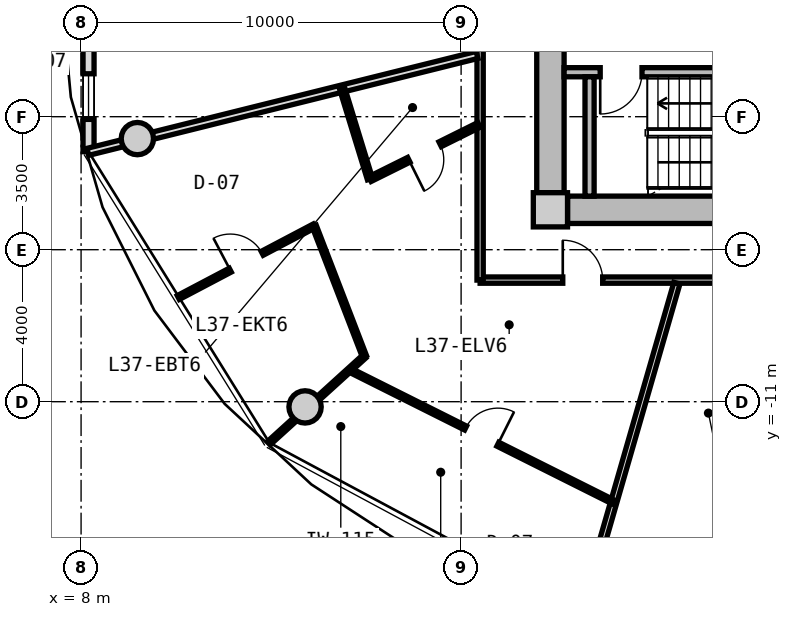
"""IFC4 building model, lengths in metres.
Left out: names, types, materials, properties, quantities, classifications, styles, units other than length and angle.
Written with IfcOpenShell. Run it as: python <this file> out.ifc"""

import sys

from ifc_helpers import new_model, si_unit, direction, frame, frame_2d, origin, origin_2d, place, context, subcontext, project, spatial, rectangle, circle, extrude, source, transform, mapped, element, fill, save


model = new_model("IFC4")
c1 = context("Model", 3, precision=1e-05, world=origin(), true_north=direction((0.0, 1.0)))
c2 = subcontext(c1, "Body", "Model", "MODEL_VIEW")
j1 = project(units=[si_unit("LENGTHUNIT", "METRE"), si_unit("PLANEANGLEUNIT", "RADIAN")], contexts=[c1])
p1 = place(None, origin())
s1 = spatial("IfcSite", under=j1, at=p1, CompositionType="ELEMENT")
p2 = place(p1, origin())
s2 = spatial("IfcBuilding", under=s1, at=p2, CompositionType="ELEMENT")
p3 = place(p2, frame((0.0, 0.0, 120.65)))
s3 = spatial("IfcBuildingStorey", under=s2, at=p3, CompositionType="ELEMENT", Elevation=120.65)
m1 = source(origin(), c2, "Body", "SweptSolid", [
    extrude(rectangle(XDim=0.9, YDim=0.9, at=origin_2d()), origin(), (0.0, 0.0, 1.0), 3.05),
])
p4 = place(p3, frame((20.35, -5.95, 0.0), z_axis=(0.0, 0.0, 1.0), x_axis=(1.0, 0.0, 0.0)))
e1 = element("IfcColumn", 1, at=p4, inside=s3, PredefinedType="COLUMN", context=c2, shape_type="MappedRepresentation", body=[
    mapped(m1, transform((0.0, 0.0, 0.0), x_axis=(1.0, 0.0, 0.0), y_axis=(0.0, 1.0, 0.0), z_axis=(0.0, 0.0, 1.0), scale=1.0)),
])
m2 = source(origin(), c2, "Body", "SweptSolid", [
    extrude(rectangle(XDim=14.4, YDim=0.72, at=frame_2d((7.2, 0.0))), origin(), (0.0, 0.0, 1.0), 2.79),
])
p5 = place(p3, frame((35.2, -5.95, 0.0), z_axis=(0.0, 0.0, 1.0), x_axis=(-1.0, 0.0, 0.0)))
e2 = element("IfcWall", 2, at=p5, inside=s3, PredefinedType="SHEAR", context=c2, shape_type="MappedRepresentation", body=[
    mapped(m2, transform((0.0, 0.0, 0.0), x_axis=(1.0, 0.0, 0.0), y_axis=(0.0, 1.0, 0.0), z_axis=(0.0, 0.0, 1.0), scale=1.0)),
])
m3 = source(origin(), c2, "Body", "SweptSolid", [
    extrude(rectangle(XDim=11.0, YDim=0.72, at=frame_2d((5.5, 0.0))), origin(), (0.0, 0.0, 1.0), 2.79),
])
p6 = place(p3, frame((20.35, -5.5, 0.0), z_axis=(0.0, 0.0, 1.0), x_axis=(0.0, 1.0, 0.0)))
e3 = element("IfcWall", 3, at=p6, inside=s3, PredefinedType="SHEAR", context=c2, shape_type="MappedRepresentation", body=[
    mapped(m3, transform((0.0, 0.0, 0.0), x_axis=(1.0, 0.0, 0.0), y_axis=(0.0, 1.0, 0.0), z_axis=(0.0, 0.0, 1.0), scale=1.0)),
])
p7 = place(p6, frame((3.8, 0.0, 0.0)))
e4 = element("IfcOpeningElement", 4, at=p7, cuts=e3, PredefinedType="OPENING", context=c2, shape_type="SweptSolid", body=[
    extrude(rectangle(XDim=1.2, YDim=2.15, at=frame_2d((0.6, 1.075))), frame((0.0, 0.37, 0.0), z_axis=(0.0, -1.0, 0.0), x_axis=(1.0, 0.0, 0.0)), (0.0, 0.0, 1.0), 0.74),
])
m4 = source(origin(), c2, "Body", "SweptSolid", [
    extrude(circle(Radius=0.425, at=origin_2d()), origin(), (0.0, 0.0, 1.0), 3.05),
])
for number, where, z_axis, x_axis in (
    (5, (9.481, -4.076, 0.0), (0.0, 0.0, 1.0), (1.0, 0.0, 0.0)),
    (6, (13.894, -11.137, 0.0), (0.0, 0.0, 1.0), (1.0, 0.0, 0.0)),
):
    element("IfcColumn", number, at=place(p3, frame(where, z_axis=z_axis, x_axis=x_axis)), inside=s3, PredefinedType="COLUMN", context=c2, shape_type="MappedRepresentation", body=[
        mapped(m4, transform((0.0, 0.0, 0.0), x_axis=(1.0, 0.0, 0.0), y_axis=(0.0, 1.0, 0.0), z_axis=(0.0, 0.0, 1.0), scale=1.0)),
    ])
m5 = source(origin(), c2, "Body", "SweptSolid", [
    extrude(rectangle(XDim=8.841, YDim=0.29, at=frame_2d((4.421, 0.0))), origin(), (0.0, 0.0, 1.0), 2.79),
])
p8 = place(p3, frame((8.196, -4.421, 0.0), z_axis=(0.0, 0.0, 1.0), x_axis=(0.0, 1.0, 0.0)))
e7 = element("IfcWall", 7, at=p8, inside=s3, PredefinedType="SOLIDWALL", context=c2, shape_type="MappedRepresentation", body=[
    mapped(m5, transform((0.0, 0.0, 0.0), x_axis=(1.0, 0.0, 0.0), y_axis=(0.0, 1.0, 0.0), z_axis=(0.0, 0.0, 1.0), scale=1.0)),
])
p9 = place(p8, frame((6.74, 0.0, 0.0)))
e8 = element("IfcOpeningElement", 8, at=p9, cuts=e7, PredefinedType="OPENING", context=c2, shape_type="SweptSolid", body=[
    extrude(rectangle(XDim=1.15, YDim=2.25, at=frame_2d((0.575, 1.125))), frame((0.0, 0.155, 0.0), z_axis=(0.0, -1.0, 0.0), x_axis=(1.0, 0.0, 0.0)), (0.0, 0.0, 1.0), 0.31),
])
p10 = place(p8, frame((0.85, 0.0, 0.85)))
e9 = element("IfcOpeningElement", 9, at=p10, cuts=e7, PredefinedType="OPENING", context=c2, shape_type="SweptSolid", body=[
    extrude(rectangle(XDim=1.2, YDim=1.5, at=frame_2d((0.6, 0.75))), frame((0.0, 0.155, 0.0), z_axis=(0.0, -1.0, 0.0), x_axis=(1.0, 0.0, 0.0)), (0.0, 0.0, 1.0), 0.31),
])
m6 = source(origin(), c2, "Body", "SweptSolid", [
    extrude(rectangle(XDim=7.83, YDim=0.24, at=frame_2d((3.915, 0.0))), origin(), (0.0, 0.0, 1.0), 2.79),
])
p11 = place(p3, frame((20.71, -2.33, 0.0), z_axis=(0.0, 0.0, 1.0), x_axis=(1.0, 0.0, 0.0)))
e10 = element("IfcWall", 10, at=p11, inside=s3, PredefinedType="PARTITIONING", context=c2, shape_type="MappedRepresentation", body=[
    mapped(m6, transform((0.0, 0.0, 0.0), x_axis=(1.0, 0.0, 0.0), y_axis=(0.0, 1.0, 0.0), z_axis=(0.0, 0.0, 1.0), scale=1.0)),
])
p12 = place(p11, frame((0.95, 0.0, 0.0)))
e11 = element("IfcOpeningElement", 11, at=p12, cuts=e10, PredefinedType="OPENING", context=c2, shape_type="SweptSolid", body=[
    extrude(rectangle(XDim=1.1, YDim=2.15, at=frame_2d((0.55, 1.075))), frame((0.0, 0.13, 0.0), z_axis=(0.0, -1.0, 0.0), x_axis=(1.0, 0.0, 0.0)), (0.0, 0.0, 1.0), 0.26),
])
m7 = source(origin(), c2, "Body", "SweptSolid", [
    extrude(rectangle(XDim=3.14, YDim=0.24, at=frame_2d((1.57, 0.0))), origin(), (0.0, 0.0, 1.0), 2.79),
])
p13 = place(p3, frame((21.38, -5.59, 0.0), z_axis=(0.0, 0.0, 1.0), x_axis=(0.0, 1.0, 0.0)))
e12 = element("IfcWall", 12, at=p13, inside=s3, PredefinedType="PARTITIONING", context=c2, shape_type="MappedRepresentation", body=[
    mapped(m7, transform((0.0, 0.0, 0.0), x_axis=(1.0, 0.0, 0.0), y_axis=(0.0, 1.0, 0.0), z_axis=(0.0, 0.0, 1.0), scale=1.0)),
])
m8 = source(origin(), c2, "Body", "SweptSolid", [
    extrude(rectangle(XDim=8.6, YDim=0.165, at=frame_2d((4.3, 0.0))), origin(), (0.0, 0.0, 1.0), 2.775),
])
p14 = place(p3, frame((27.1, -7.8, 0.0), z_axis=(0.0, 0.0, 1.0), x_axis=(-1.0, 0.0, 0.0)))
e13 = element("IfcWall", 13, at=p14, inside=s3, PredefinedType="PARTITIONING", context=c2, shape_type="MappedRepresentation", body=[
    mapped(m8, transform((0.0, 0.0, 0.0), x_axis=(1.0, 0.0, 0.0), y_axis=(0.0, 1.0, 0.0), z_axis=(0.0, 0.0, 1.0), scale=1.0)),
])
p15 = place(p14, frame((5.375, 0.0, 0.0)))
e14 = element("IfcOpeningElement", 14, at=p15, cuts=e13, PredefinedType="OPENING", context=c2, shape_type="SweptSolid", body=[
    extrude(rectangle(XDim=1.05, YDim=2.15, at=frame_2d((0.525, 1.075))), frame((0.0, 0.093, 0.0), z_axis=(0.0, -1.0, 0.0), x_axis=(1.0, 0.0, 0.0)), (0.0, 0.0, 1.0), 0.185),
])
m9 = source(origin(), c2, "Body", "SweptSolid", [
    extrude(rectangle(XDim=15.6, YDim=0.165, at=frame_2d((7.8, 0.0))), origin(), (0.0, 0.0, 1.0), 2.775),
])
p16 = place(p3, frame((18.5, -7.8, 0.0), z_axis=(0.0, 0.0, 1.0), x_axis=(0.0, 1.0, 0.0)))
e15 = element("IfcWall", 15, at=p16, inside=s3, PredefinedType="PARTITIONING", context=c2, shape_type="MappedRepresentation", body=[
    mapped(m9, transform((0.0, 0.0, 0.0), x_axis=(1.0, 0.0, 0.0), y_axis=(0.0, 1.0, 0.0), z_axis=(0.0, 0.0, 1.0), scale=1.0)),
])
p17 = place(p16, frame((10.383, 0.0, 0.0)))
e16 = element("IfcOpeningElement", 16, at=p17, cuts=e15, PredefinedType="OPENING", context=c2, shape_type="SweptSolid", body=[
    extrude(rectangle(XDim=1.05, YDim=2.15, at=frame_2d((0.525, 1.075))), frame((0.0, 0.093, 0.0), z_axis=(0.0, -1.0, 0.0), x_axis=(1.0, 0.0, 0.0)), (0.0, 0.0, 1.0), 0.185),
])
p18 = place(p16, frame((6.419, 0.0, 0.0)))
e17 = element("IfcOpeningElement", 17, at=p18, cuts=e15, PredefinedType="OPENING", context=c2, shape_type="SweptSolid", body=[
    extrude(rectangle(XDim=1.05, YDim=2.15, at=frame_2d((0.525, 1.075))), frame((0.0, 0.093, 0.0), z_axis=(0.0, -1.0, 0.0), x_axis=(1.0, 0.0, 0.0)), (0.0, 0.0, 1.0), 0.185),
])
m10 = source(origin(), c2, "Body", "SweptSolid", [
    extrude(rectangle(XDim=8.989, YDim=0.165, at=frame_2d((4.495, 0.0))), origin(), (0.0, 0.0, 1.0), 2.275),
])
p19 = place(p3, frame((23.678, -7.88, 0.0), z_axis=(0.0, 0.0, 1.0), x_axis=(-0.27702323008, -0.960863221274, 0.0)))
e18 = element("IfcWall", 18, at=p19, inside=s3, PredefinedType="PARTITIONING", context=c2, shape_type="MappedRepresentation", body=[
    mapped(m10, transform((0.0, 0.0, 0.0), x_axis=(1.0, 0.0, 0.0), y_axis=(0.0, 1.0, 0.0), z_axis=(0.0, 0.0, 1.0), scale=1.0)),
])
m11 = source(origin(), c2, "Body", "SweptSolid", [
    extrude(rectangle(XDim=10.556, YDim=0.19, at=frame_2d((5.278, 0.0))), origin(), (0.0, 0.0, 1.0), 2.275),
])
p20 = place(p3, frame((18.42, -1.875, 0.0), z_axis=(0.0, 0.0, 1.0), x_axis=(-0.970363857851, -0.241648470667, 0.0)))
e19 = element("IfcWall", 19, at=p20, inside=s3, PredefinedType="PARTITIONING", context=c2, shape_type="MappedRepresentation", body=[
    mapped(m11, transform((0.0, 0.0, 0.0), x_axis=(1.0, 0.0, 0.0), y_axis=(0.0, 1.0, 0.0), z_axis=(0.0, 0.0, 1.0), scale=1.0)),
])
m12 = source(origin(), c2, "Body", "SweptSolid", [
    extrude(rectangle(XDim=7.767, YDim=0.115, at=frame_2d((3.884, 0.0))), origin(), (0.0, 0.0, 1.0), 2.775),
])
p21 = place(p3, frame((15.07, -10.167, 0.0), z_axis=(0.0, 0.0, 1.0), x_axis=(0.894188177352, -0.447691303783, 0.0)))
e20 = element("IfcWall", 20, at=p21, inside=s3, PredefinedType="PARTITIONING", context=c2, shape_type="MappedRepresentation", body=[
    mapped(m12, transform((0.0, 0.0, 0.0), x_axis=(1.0, 0.0, 0.0), y_axis=(0.0, 1.0, 0.0), z_axis=(0.0, 0.0, 1.0), scale=1.0)),
])
p22 = place(p21, frame((3.409, 0.0, 0.0)))
e21 = element("IfcOpeningElement", 21, at=p22, cuts=e20, PredefinedType="OPENING", context=c2, shape_type="SweptSolid", body=[
    extrude(rectangle(XDim=0.95, YDim=2.1, at=frame_2d((0.475, 1.05))), frame((0.0, 0.067, 0.0), z_axis=(0.0, -1.0, 0.0), x_axis=(1.0, 0.0, 0.0)), (0.0, 0.0, 1.0), 0.135),
])
m13 = source(origin(), c2, "Body", "SweptSolid", [
    extrude(rectangle(XDim=3.393, YDim=0.115, at=frame_2d((1.696, 0.0))), origin(), (0.0, 0.0, 1.0), 2.275),
])
p23 = place(p3, frame((15.451, -9.811, 0.0), z_axis=(0.0, 0.0, 1.0), x_axis=(-0.740356690907, -0.672214229416, 0.0)))
e22 = element("IfcWall", 22, at=p23, inside=s3, PredefinedType="PARTITIONING", context=c2, shape_type="MappedRepresentation", body=[
    mapped(m13, transform((0.0, 0.0, 0.0), x_axis=(1.0, 0.0, 0.0), y_axis=(0.0, 1.0, 0.0), z_axis=(0.0, 0.0, 1.0), scale=1.0)),
])
m14 = source(origin(), c2, "Body", "SweptSolid", [
    extrude(rectangle(XDim=3.203, YDim=0.14, at=frame_2d((1.601, 0.0))), origin(), (0.0, 0.0, 1.0), 2.775),
])
p24 = place(p3, frame((18.47, -3.717, 0.0), z_axis=(0.0, 0.0, 1.0), x_axis=(-0.895552551978, -0.444955758077, 0.0)))
e23 = element("IfcWall", 23, at=p24, inside=s3, PredefinedType="PARTITIONING", context=c2, shape_type="MappedRepresentation", body=[
    mapped(m14, transform((0.0, 0.0, 0.0), x_axis=(1.0, 0.0, 0.0), y_axis=(0.0, 1.0, 0.0), z_axis=(0.0, 0.0, 1.0), scale=1.0)),
])
p25 = place(p24, frame((1.141, 0.0, 0.0)))
e24 = element("IfcOpeningElement", 24, at=p25, cuts=e23, PredefinedType="OPENING", context=c2, shape_type="SweptSolid", body=[
    extrude(rectangle(XDim=0.92, YDim=2.1, at=frame_2d((0.46, 1.05))), frame((0.0, 0.08, 0.0), z_axis=(0.0, -1.0, 0.0), x_axis=(1.0, 0.0, 0.0)), (0.0, 0.0, 1.0), 0.16),
])
m15 = source(origin(), c2, "Body", "SweptSolid", [
    extrude(rectangle(XDim=2.478, YDim=0.14, at=frame_2d((1.239, 0.0))), origin(), (0.0, 0.0, 1.0), 2.775),
])
p26 = place(p3, frame((15.602, -5.142, 0.0), z_axis=(0.0, 0.0, 1.0), x_axis=(-0.293372504398, 0.955998207981, 0.0)))
e25 = element("IfcWall", 25, at=p26, inside=s3, PredefinedType="PARTITIONING", context=c2, shape_type="MappedRepresentation", body=[
    mapped(m15, transform((0.0, 0.0, 0.0), x_axis=(1.0, 0.0, 0.0), y_axis=(0.0, 1.0, 0.0), z_axis=(0.0, 0.0, 1.0), scale=1.0)),
])
m16 = source(origin(), c2, "Body", "SweptSolid", [
    extrude(rectangle(XDim=4.042, YDim=0.115, at=frame_2d((2.021, 0.0))), origin(), (0.0, 0.0, 1.0), 2.775),
])
p27 = place(p3, frame((14.134, -6.375, 0.0), z_axis=(0.0, 0.0, 1.0), x_axis=(-0.88476748851, -0.466032714812, 0.0)))
e26 = element("IfcWall", 26, at=p27, inside=s3, PredefinedType="PARTITIONING", context=c2, shape_type="MappedRepresentation", body=[
    mapped(m16, transform((0.0, 0.0, 0.0), x_axis=(1.0, 0.0, 0.0), y_axis=(0.0, 1.0, 0.0), z_axis=(0.0, 0.0, 1.0), scale=1.0)),
])
p28 = place(p27, frame((1.546, 0.0, 0.0)))
e27 = element("IfcOpeningElement", 27, at=p28, cuts=e26, PredefinedType="OPENING", context=c2, shape_type="SweptSolid", body=[
    extrude(rectangle(XDim=0.95, YDim=2.1, at=frame_2d((0.475, 1.05))), frame((0.0, 0.067, 0.0), z_axis=(0.0, -1.0, 0.0), x_axis=(1.0, 0.0, 0.0)), (0.0, 0.0, 1.0), 0.135),
])
m17 = source(origin(), c2, "Body", "SweptSolid", [
    extrude(rectangle(XDim=3.677, YDim=0.115, at=frame_2d((1.838, 0.0))), origin(), (0.0, 0.0, 1.0), 2.775),
])
p29 = place(p3, frame((14.134, -6.375, 0.0), z_axis=(0.0, 0.0, 1.0), x_axis=(0.359592980271, -0.933109258629, 0.0)))
e28 = element("IfcWall", 28, at=p29, inside=s3, PredefinedType="PARTITIONING", context=c2, shape_type="MappedRepresentation", body=[
    mapped(m17, transform((0.0, 0.0, 0.0), x_axis=(1.0, 0.0, 0.0), y_axis=(0.0, 1.0, 0.0), z_axis=(0.0, 0.0, 1.0), scale=1.0)),
])
m18 = source(origin(), c2, "Body", "SweptSolid", [
    extrude(rectangle(XDim=1.2, YDim=1.5, at=frame_2d((0.6, 0.75))), frame((0.0, 0.03, 0.0), z_axis=(0.0, -1.0, 0.0), x_axis=(1.0, 0.0, 0.0)), (0.0, 0.0, 1.0), 0.06),
])
p30 = place(p10, origin())
e29 = element("IfcWindow", 29, at=p30, inside=s3, PartitioningType="SINGLE_PANEL", PredefinedType="WINDOW", context=c2, shape_type="MappedRepresentation", body=[
    mapped(m18, transform((0.0, 0.0, 0.0), x_axis=(1.0, 0.0, 0.0), y_axis=(0.0, 1.0, 0.0), z_axis=(0.0, 0.0, 1.0), scale=1.0)),
])
fill(e9, e29)
m19 = source(origin(), c2, "Body", "SweptSolid", [
    extrude(rectangle(XDim=1.1, YDim=2.15, at=frame_2d((0.55, 1.075))), frame((0.0, 0.025, 0.0), z_axis=(0.0, -1.0, 0.0), x_axis=(1.0, 0.0, 0.0)), (0.0, 0.0, 1.0), 0.05),
])
p31 = place(p12, frame((1.1, 0.0, 0.0), z_axis=(0.0, 0.0, 1.0), x_axis=(-1.0, 0.0, 0.0)))
e30 = element("IfcDoor", 30, at=p31, inside=s3, OperationType="SINGLE_SWING_RIGHT", PredefinedType="DOOR", context=c2, shape_type="MappedRepresentation", body=[
    mapped(m19, transform((0.0, 0.0, 0.0), x_axis=(1.0, 0.0, 0.0), y_axis=(0.0, 1.0, 0.0), z_axis=(0.0, 0.0, 1.0), scale=1.0)),
])
fill(e11, e30)
m20 = source(origin(), c2, "Body", "SweptSolid", [
    extrude(rectangle(XDim=1.05, YDim=2.15, at=frame_2d((0.525, 1.075))), frame((0.0, 0.025, 0.0), z_axis=(0.0, -1.0, 0.0), x_axis=(1.0, 0.0, 0.0)), (0.0, 0.0, 1.0), 0.05),
])
p32 = place(p15, frame((1.05, 0.0, 0.0), z_axis=(0.0, 0.0, 1.0), x_axis=(-1.0, 0.0, 0.0)))
e31 = element("IfcDoor", 31, at=p32, inside=s3, OperationType="SINGLE_SWING_LEFT", PredefinedType="DOOR", context=c2, shape_type="MappedRepresentation", body=[
    mapped(m20, transform((0.0, 0.0, 0.0), x_axis=(1.0, 0.0, 0.0), y_axis=(0.0, 1.0, 0.0), z_axis=(0.0, 0.0, 1.0), scale=1.0)),
])
fill(e14, e31)
m21 = source(origin(), c2, "Body", "SweptSolid", [
    extrude(rectangle(XDim=0.92, YDim=2.1, at=frame_2d((0.46, 1.05))), frame((0.0, 0.025, 0.0), z_axis=(0.0, -1.0, 0.0), x_axis=(1.0, 0.0, 0.0)), (0.0, 0.0, 1.0), 0.05),
])
p33 = place(p25, origin())
e32 = element("IfcDoor", 32, at=p33, inside=s3, OperationType="SINGLE_SWING_RIGHT", PredefinedType="DOOR", context=c2, shape_type="MappedRepresentation", body=[
    mapped(m21, transform((0.0, 0.0, 0.0), x_axis=(1.0, 0.0, 0.0), y_axis=(0.0, 1.0, 0.0), z_axis=(0.0, 0.0, 1.0), scale=1.0)),
])
fill(e24, e32)
m22 = source(origin(), c2, "Body", "SweptSolid", [
    extrude(rectangle(XDim=0.95, YDim=2.1, at=frame_2d((0.475, 1.05))), frame((0.0, 0.025, 0.0), z_axis=(0.0, -1.0, 0.0), x_axis=(1.0, 0.0, 0.0)), (0.0, 0.0, 1.0), 0.05),
])
p34 = place(p28, frame((0.95, 0.0, 0.0), z_axis=(0.0, 0.0, 1.0), x_axis=(-1.0, 0.0, 0.0)))
e33 = element("IfcDoor", 33, at=p34, inside=s3, OperationType="SINGLE_SWING_LEFT", PredefinedType="DOOR", context=c2, shape_type="MappedRepresentation", body=[
    mapped(m22, transform((0.0, 0.0, 0.0), x_axis=(1.0, 0.0, 0.0), y_axis=(0.0, 1.0, 0.0), z_axis=(0.0, 0.0, 1.0), scale=1.0)),
])
fill(e27, e33)
p35 = place(p22, origin())
e34 = element("IfcDoor", 34, at=p35, inside=s3, OperationType="SINGLE_SWING_RIGHT", PredefinedType="DOOR", context=c2, shape_type="MappedRepresentation", body=[
    mapped(m22, transform((0.0, 0.0, 0.0), x_axis=(1.0, 0.0, 0.0), y_axis=(0.0, 1.0, 0.0), z_axis=(0.0, 0.0, 1.0), scale=1.0)),
])
fill(e21, e34)
save(model, sys.argv[1])
